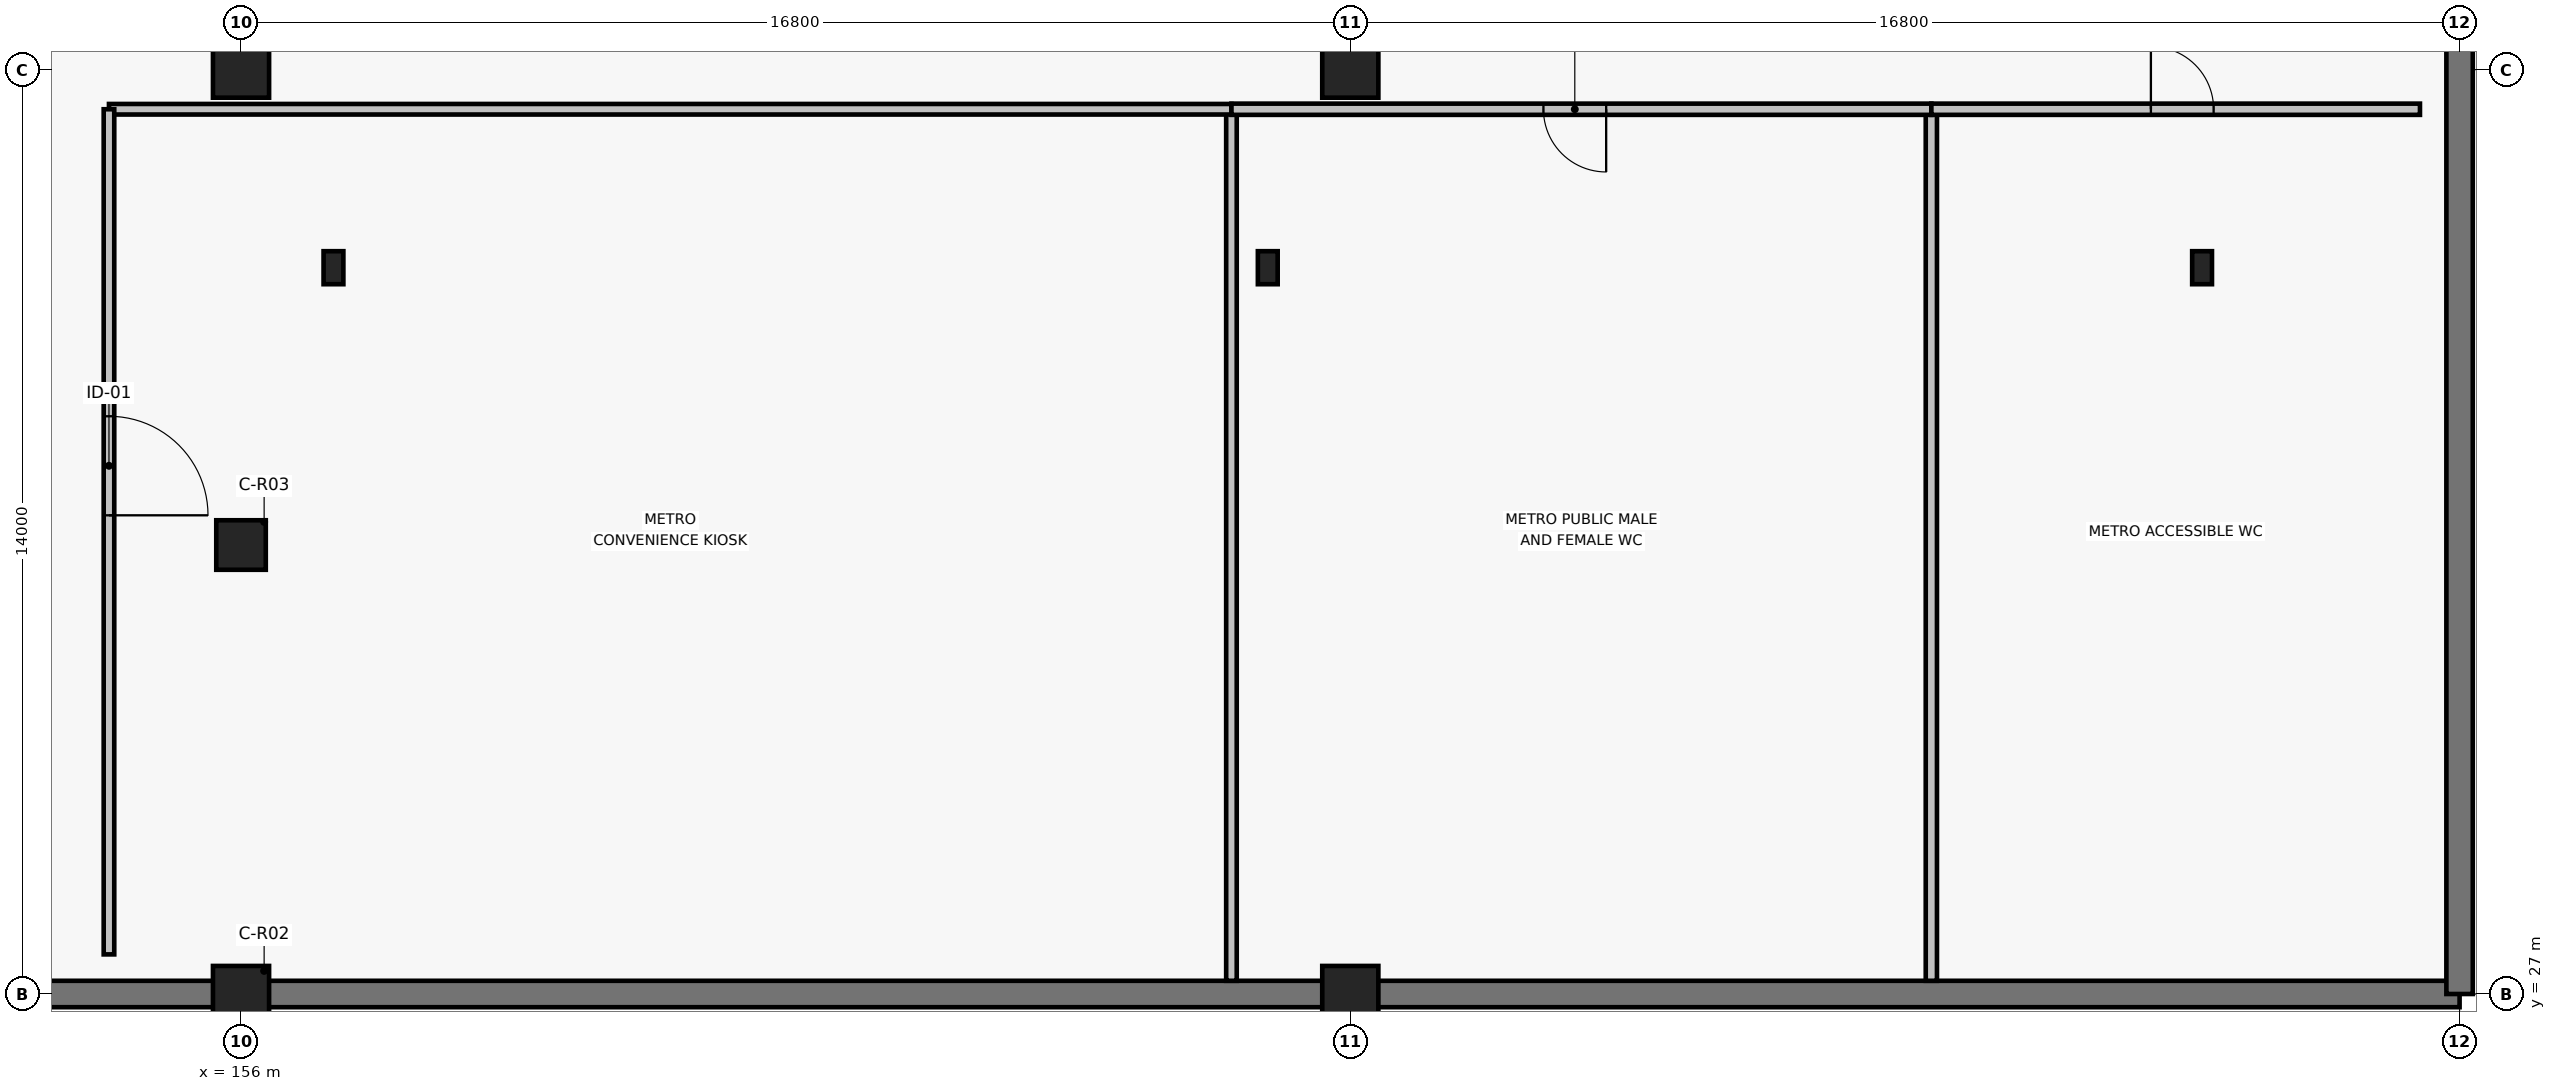
"""IFC4 building model, lengths in metres.
Left out: names, types, materials, properties, quantities, classifications, styles, units other than length and angle.
Written with IfcOpenShell. Run it as: python <this file> out.ifc"""

import sys

from ifc_helpers import new_model, si_unit, direction, frame, frame_2d, origin, origin_2d, place, context, subcontext, project, spatial, rectangle, i_section, extrude, element, fill, save


model = new_model("IFC4")
c1 = context("Model", 3, precision=1e-05, world=origin(), true_north=direction((0.0, 1.0)))
c2 = subcontext(c1, "Body", "Model", "MODEL_VIEW")
j1 = project(units=[si_unit("LENGTHUNIT", "METRE"), si_unit("PLANEANGLEUNIT", "RADIAN")], contexts=[c1])
p1 = place(None, origin())
s1 = spatial("IfcSite", under=j1, at=p1, CompositionType="ELEMENT")
p2 = place(p1, origin())
s2 = spatial("IfcBuilding", under=s1, at=p2, CompositionType="ELEMENT")
p3 = place(p2, frame((0.0, 0.0, -6.0)))
s3 = spatial("IfcBuildingStorey", under=s2, at=p3, CompositionType="ELEMENT", Elevation=-6.0)
for number, where, z_axis, x_axis in (
    (1, (156.0, 27.0, 0.0), (0.0, 0.0, 1.0), (1.0, 0.0, 0.0)),
    (2, (156.0, 41.0, 0.0), (0.0, 0.0, 1.0), (1.0, 0.0, 0.0)),
    (3, (172.8, 27.0, 0.0), (0.0, 0.0, 1.0), (1.0, 0.0, 0.0)),
    (4, (172.8, 41.0, 0.0), (0.0, 0.0, 1.0), (1.0, 0.0, 0.0)),
):
    element("IfcColumn", number, at=place(p3, frame(where, z_axis=z_axis, x_axis=x_axis)), inside=s3, PredefinedType="COLUMN", context=c2, shape_type="SweptSolid", body=[
        extrude(rectangle(XDim=0.85, YDim=0.85, at=origin_2d()), origin(), (0.0, 0.0, 1.0), 6.0),
    ])
p4 = place(p3, frame((156.0, 33.8, 0.0), z_axis=(0.0, 0.0, 1.0), x_axis=(1.0, 0.0, 0.0)))
e5 = element("IfcColumn", 5, at=p4, inside=s3, PredefinedType="COLUMN", context=c2, shape_type="SweptSolid", body=[
    extrude(rectangle(XDim=0.75, YDim=0.75, at=origin_2d()), origin(), (0.0, 0.0, 1.0), 6.0),
])
p5 = place(p3, frame((139.2, 27.0, 0.0), z_axis=(0.0, 0.0, 1.0), x_axis=(1.0, 0.0, 0.0)))
e6 = element("IfcWall", 6, at=p5, inside=s3, PredefinedType="SOLIDWALL", context=c2, shape_type="SweptSolid", body=[
    extrude(rectangle(XDim=50.4, YDim=0.4, at=frame_2d((25.2, 0.0))), origin(), (0.0, 0.0, 1.0), 6.0),
])
p6 = place(p3, frame((189.6, 27.0, 0.0), z_axis=(0.0, 0.0, 1.0), x_axis=(0.0, 1.0, 0.0)))
e7 = element("IfcWall", 7, at=p6, inside=s3, PredefinedType="SOLIDWALL", context=c2, shape_type="SweptSolid", body=[
    extrude(rectangle(XDim=64.0, YDim=0.4, at=frame_2d((32.0, 0.0))), origin(), (0.0, 0.0, 1.0), 6.0),
])
for number, where, z_axis, x_axis in (
    (8, (157.4, 38.0, 0.0), (0.0, 0.0, 1.0), (1.0, 0.0, 0.0)),
    (9, (171.55, 38.0, 0.0), (0.0, 0.0, 1.0), (1.0, 0.0, 0.0)),
    (10, (185.7, 38.0, 0.0), (0.0, 0.0, 1.0), (1.0, 0.0, 0.0)),
):
    element("IfcColumn", number, at=place(p3, frame(where, z_axis=z_axis, x_axis=x_axis)), inside=s3, PredefinedType="COLUMN", context=c2, shape_type="SweptSolid", body=[
        extrude(i_section(OverallWidth=0.3, OverallDepth=0.5, WebThickness=0.014, FlangeThickness=0.028, FilletRadius=0.027, at=origin_2d()), origin(), (0.0, 0.0, 1.0), 6.0),
    ])
p7 = place(p3, frame((171.0, 27.2, 0.0), z_axis=(0.0, 0.0, 1.0), x_axis=(0.0, 1.0, 0.0)))
e11 = element("IfcWall", 11, at=p7, inside=s3, PredefinedType="PARTITIONING", context=c2, shape_type="SweptSolid", body=[
    extrude(rectangle(XDim=13.2, YDim=0.16, at=frame_2d((6.6, 0.0))), origin(), (0.0, 0.0, 1.0), 5.75),
])
p8 = place(p3, frame((171.0, 40.4, 0.0), z_axis=(0.0, 0.0, 1.0), x_axis=(-1.0, 0.0, 0.0)))
e12 = element("IfcWall", 12, at=p8, inside=s3, PredefinedType="PARTITIONING", context=c2, shape_type="SweptSolid", body=[
    extrude(rectangle(XDim=17.0, YDim=0.16, at=frame_2d((8.5, 0.0))), origin(), (0.0, 0.0, 1.0), 5.145),
])
p9 = place(p3, frame((154.0, 40.4, 0.0), z_axis=(0.0, 0.0, 1.0), x_axis=(0.0, -1.0, 0.0)))
e13 = element("IfcWall", 13, at=p9, inside=s3, PredefinedType="PARTITIONING", context=c2, shape_type="SweptSolid", body=[
    extrude(rectangle(XDim=12.8, YDim=0.16, at=frame_2d((6.4, 0.0))), origin(), (0.0, 0.0, 1.0), 5.75),
])
p10 = place(p9, frame((6.15, 0.0, 0.0), z_axis=(0.0, 0.0, 1.0), x_axis=(-1.0, 0.0, 0.0)))
e14 = element("IfcOpeningElement", 14, at=p10, cuts=e13, PredefinedType="OPENING", context=c2, shape_type="SweptSolid", body=[
    extrude(rectangle(XDim=1.5, YDim=2.25, at=frame_2d((0.75, 1.125))), frame((0.0, 0.09, 0.0), z_axis=(0.0, -1.0, 0.0), x_axis=(1.0, 0.0, 0.0)), (0.0, 0.0, 1.0), 0.18),
])
p11 = place(p3, frame((181.6, 27.2, 0.0), z_axis=(0.0, 0.0, 1.0), x_axis=(0.0, 1.0, 0.0)))
e15 = element("IfcWall", 15, at=p11, inside=s3, PredefinedType="PLUMBINGWALL", context=c2, shape_type="SweptSolid", body=[
    extrude(rectangle(XDim=13.2, YDim=0.17, at=frame_2d((6.6, 0.0))), origin(), (0.0, 0.0, 1.0), 5.75),
])
p12 = place(p3, frame((181.6, 40.4, 0.0), z_axis=(0.0, 0.0, 1.0), x_axis=(-1.0, 0.0, 0.0)))
e16 = element("IfcWall", 16, at=p12, inside=s3, PredefinedType="PLUMBINGWALL", context=c2, shape_type="SweptSolid", body=[
    extrude(rectangle(XDim=10.6, YDim=0.17, at=frame_2d((5.3, 0.0))), origin(), (0.0, 0.0, 1.0), 5.145),
])
p13 = place(p12, frame((4.925, 0.0, 0.0)))
e17 = element("IfcOpeningElement", 17, at=p13, cuts=e16, PredefinedType="OPENING", context=c2, shape_type="SweptSolid", body=[
    extrude(rectangle(XDim=0.95, YDim=2.15, at=frame_2d((0.475, 1.075))), frame((0.0, 0.095, 0.0), z_axis=(0.0, -1.0, 0.0), x_axis=(1.0, 0.0, 0.0)), (0.0, 0.0, 1.0), 0.19),
])
p14 = place(p3, frame((189.0, 40.4, 0.0), z_axis=(0.0, 0.0, 1.0), x_axis=(-1.0, 0.0, 0.0)))
e18 = element("IfcWall", 18, at=p14, inside=s3, PredefinedType="PLUMBINGWALL", context=c2, shape_type="SweptSolid", body=[
    extrude(rectangle(XDim=7.4, YDim=0.17, at=frame_2d((3.7, 0.0))), origin(), (0.0, 0.0, 1.0), 5.75),
])
p15 = place(p14, frame((3.125, 0.0, 0.0)))
e19 = element("IfcOpeningElement", 19, at=p15, cuts=e18, PredefinedType="OPENING", context=c2, shape_type="SweptSolid", body=[
    extrude(rectangle(XDim=0.95, YDim=2.15, at=frame_2d((0.475, 1.075))), frame((0.0, 0.095, 0.0), z_axis=(0.0, -1.0, 0.0), x_axis=(1.0, 0.0, 0.0)), (0.0, 0.0, 1.0), 0.19),
])
p16 = place(p10, origin())
e20 = element("IfcDoor", 20, at=p16, inside=s3, OperationType="SINGLE_SWING_RIGHT", PredefinedType="DOOR", context=c2, shape_type="SweptSolid", body=[
    extrude(rectangle(XDim=1.5, YDim=2.25, at=frame_2d((0.75, 1.125))), frame((0.0, 0.025, 0.0), z_axis=(0.0, -1.0, 0.0), x_axis=(1.0, 0.0, 0.0)), (0.0, 0.0, 1.0), 0.05),
])
fill(e14, e20)
p17 = place(p13, origin())
e21 = element("IfcDoor", 21, at=p17, inside=s3, OperationType="SINGLE_SWING_LEFT", PredefinedType="DOOR", context=c2, shape_type="SweptSolid", body=[
    extrude(rectangle(XDim=0.95, YDim=2.15, at=frame_2d((0.475, 1.075))), frame((0.0, 0.025, 0.0), z_axis=(0.0, -1.0, 0.0), x_axis=(1.0, 0.0, 0.0)), (0.0, 0.0, 1.0), 0.05),
])
fill(e17, e21)
p18 = place(p15, origin())
e22 = element("IfcDoor", 22, at=p18, inside=s3, OperationType="SINGLE_SWING_RIGHT", PredefinedType="DOOR", context=c2, shape_type="SweptSolid", body=[
    extrude(rectangle(XDim=0.95, YDim=2.15, at=frame_2d((0.475, 1.075))), frame((0.0, 0.025, 0.0), z_axis=(0.0, -1.0, 0.0), x_axis=(1.0, 0.0, 0.0)), (0.0, 0.0, 1.0), 0.05),
])
fill(e19, e22)
save(model, sys.argv[1])
